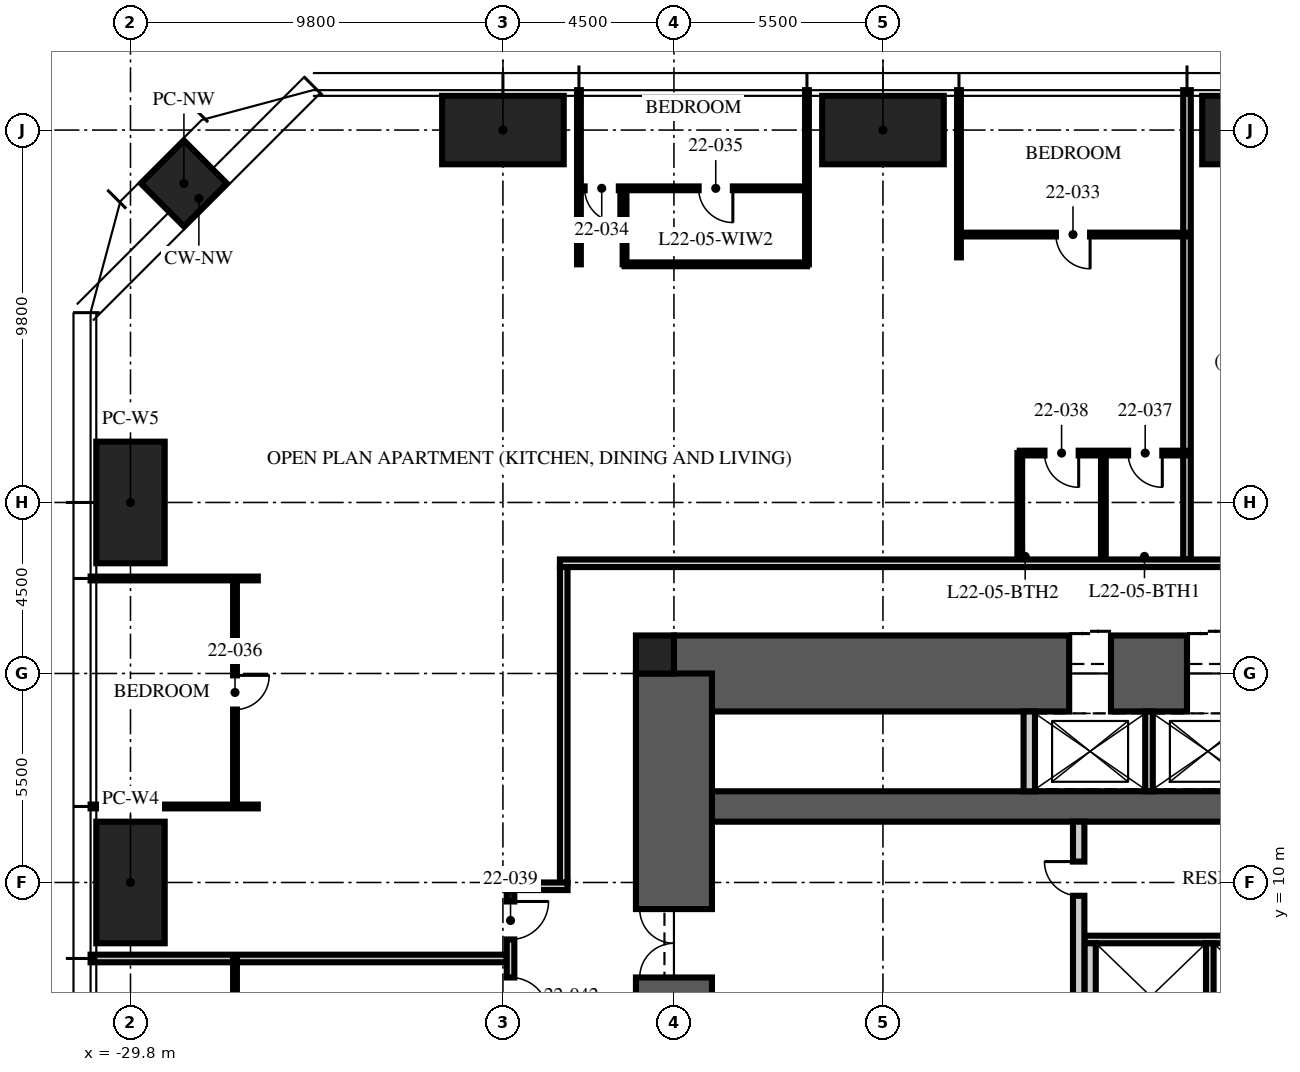
"""IFC4 building model, lengths in metres.
Left out: names, types, materials, properties, quantities, classifications, styles, units other than length and angle.
Written with IfcOpenShell. Run it as: python <this file> out.ifc"""

import sys

from ifc_helpers import new_model, si_unit, direction, frame, frame_2d, origin, origin_2d, place, context, subcontext, project, spatial, rectangle, hollow_rectangle, extrude, element, fill, save


model = new_model("IFC4")
c1 = context("Model", 3, precision=1e-05, world=origin(), true_north=direction((0.0, 1.0)))
c2 = subcontext(c1, "Body", "Model", "MODEL_VIEW")
j1 = project(units=[si_unit("LENGTHUNIT", "METRE"), si_unit("PLANEANGLEUNIT", "RADIAN")], contexts=[c1])
p1 = place(None, origin())
s1 = spatial("IfcSite", under=j1, at=p1, CompositionType="ELEMENT")
p2 = place(p1, origin())
s2 = spatial("IfcBuilding", under=s1, at=p2, CompositionType="ELEMENT")
p3 = place(p2, frame((0.0, 0.0, 88.5)))
s3 = spatial("IfcBuildingStorey", under=s2, at=p3, CompositionType="ELEMENT", Elevation=88.5)
p4 = place(p3, frame((-15.5, 15.5, -0.25), z_axis=(0.0, 0.0, 1.0), x_axis=(1.0, 0.0, 0.0)))
e1 = element("IfcWall", 1, at=p4, inside=s3, PredefinedType="SHEAR", context=c2, shape_type="SweptSolid", body=[
    extrude(rectangle(XDim=31.0, YDim=2.0, at=frame_2d((15.5, 0.0))), origin(), (0.0, 0.0, 1.0), 3.75),
])
p5 = place(p4, frame((10.4, 0.0, 0.25)))
e2 = element("IfcOpeningElement", 2, at=p5, cuts=e1, PredefinedType="OPENING", context=c2, shape_type="SweptSolid", body=[
    extrude(rectangle(XDim=1.1, YDim=2.1, at=frame_2d((0.55, 1.05))), frame((0.0, 1.01, 0.0), z_axis=(0.0, -1.0, 0.0), x_axis=(1.0, 0.0, 0.0)), (0.0, 0.0, 1.0), 2.02),
])
p6 = place(p4, frame((13.5, 0.0, 0.25)))
e3 = element("IfcOpeningElement", 3, at=p6, cuts=e1, PredefinedType="OPENING", context=c2, shape_type="SweptSolid", body=[
    extrude(rectangle(XDim=1.1, YDim=2.1, at=frame_2d((0.55, 1.05))), frame((0.0, 1.01, 0.0), z_axis=(0.0, -1.0, 0.0), x_axis=(1.0, 0.0, 0.0)), (0.0, 0.0, 1.0), 2.02),
])
p7 = place(p4, frame((16.6, 0.0, 0.25)))
e4 = element("IfcOpeningElement", 4, at=p7, cuts=e1, PredefinedType="OPENING", context=c2, shape_type="SweptSolid", body=[
    extrude(rectangle(XDim=1.1, YDim=2.1, at=frame_2d((0.55, 1.05))), frame((0.0, 1.01, 0.0), z_axis=(0.0, -1.0, 0.0), x_axis=(1.0, 0.0, 0.0)), (0.0, 0.0, 1.0), 2.02),
])
p8 = place(p3, frame((-15.5, 12.0, -0.25), z_axis=(0.0, 0.0, 1.0), x_axis=(1.0, 0.0, 0.0)))
e5 = element("IfcWall", 5, at=p8, inside=s3, PredefinedType="SHEAR", context=c2, shape_type="SweptSolid", body=[
    extrude(rectangle(XDim=31.0, YDim=0.8, at=frame_2d((15.5, 0.0))), origin(), (0.0, 0.0, 1.0), 3.75),
])
p9 = place(p3, frame((-15.5, -15.5, -0.25), z_axis=(0.0, 0.0, 1.0), x_axis=(0.0, 1.0, 0.0)))
e6 = element("IfcWall", 6, at=p9, inside=s3, PredefinedType="SHEAR", context=c2, shape_type="SweptSolid", body=[
    extrude(rectangle(XDim=31.0, YDim=2.0, at=frame_2d((15.5, 0.0))), origin(), (0.0, 0.0, 1.0), 3.75),
])
p10 = place(p9, frame((6.5, 0.0, 0.25)))
e7 = element("IfcOpeningElement", 7, at=p10, cuts=e6, PredefinedType="OPENING", context=c2, shape_type="SweptSolid", body=[
    extrude(rectangle(XDim=1.2, YDim=2.1, at=frame_2d((0.6, 1.05))), frame((0.0, 1.01, 0.0), z_axis=(0.0, -1.0, 0.0), x_axis=(1.0, 0.0, 0.0)), (0.0, 0.0, 1.0), 2.02),
])
p11 = place(p9, frame((23.0, 0.0, 0.25)))
e8 = element("IfcOpeningElement", 8, at=p11, cuts=e6, PredefinedType="OPENING", context=c2, shape_type="SweptSolid", body=[
    extrude(rectangle(XDim=1.8, YDim=2.1, at=frame_2d((0.9, 1.05))), frame((0.0, 1.01, 0.0), z_axis=(0.0, -1.0, 0.0), x_axis=(1.0, 0.0, 0.0)), (0.0, 0.0, 1.0), 2.02),
])
p12 = place(p3, frame((-16.0, 16.0, -0.25), z_axis=(0.0, 0.0, 1.0), x_axis=(1.0, 0.0, 0.0)))
e9 = element("IfcColumn", 9, at=p12, inside=s3, PredefinedType="COLUMN", context=c2, shape_type="SweptSolid", body=[
    extrude(rectangle(XDim=1.0, YDim=1.0, at=origin_2d()), origin(), (0.0, 0.0, 1.0), 3.75),
])
for number, where, z_axis, x_axis in (
    (10, (-20.0, 29.8, 0.0), (0.0, 0.0, 1.0), (1.0, 0.0, 0.0)),
    (11, (-10.0, 29.8, 0.0), (0.0, 0.0, 1.0), (1.0, 0.0, 0.0)),
    (12, (0.0, 29.8, 0.0), (0.0, 0.0, 1.0), (1.0, 0.0, 0.0)),
    (13, (-29.8, 10.0, 0.0), (0.0, 0.0, 1.0), (0.0, 1.0, 0.0)),
    (14, (-29.8, 20.0, 0.0), (0.0, 0.0, 1.0), (0.0, 1.0, 0.0)),
):
    element("IfcColumn", number, at=place(p3, frame(where, z_axis=z_axis, x_axis=x_axis)), inside=s3, PredefinedType="COLUMN", context=c2, shape_type="SweptSolid", body=[
        extrude(hollow_rectangle(XDim=3.2, YDim=1.8, WallThickness=0.2, at=origin_2d()), origin(), (0.0, 0.0, 1.0), 3.75),
    ])
p13 = place(p3, frame((-28.394, 28.394, 0.0), z_axis=(0.0, 0.0, 1.0), x_axis=(0.707106781187, 0.707106781187, 0.0)))
e15 = element("IfcColumn", 15, at=p13, inside=s3, PredefinedType="COLUMN", context=c2, shape_type="SweptSolid", body=[
    extrude(hollow_rectangle(XDim=1.6, YDim=1.6, WallThickness=0.1, at=origin_2d()), origin(), (0.0, 0.0, 1.0), 3.75),
])
p14 = place(p3, frame((-4.7, 8.5, 0.0), z_axis=(0.0, 0.0, 1.0), x_axis=(1.0, 0.0, 0.0)))
e16 = element("IfcWall", 16, at=p14, inside=s3, PredefinedType="PARTITIONING", context=c2, shape_type="SweptSolid", body=[
    extrude(rectangle(XDim=9.7, YDim=0.2, at=frame_2d((4.85, 0.0))), origin(), (0.0, 0.0, 1.0), 3.5),
])
p15 = place(p3, frame((-4.55, 5.6, 0.0), z_axis=(0.0, 0.0, 1.0), x_axis=(0.0, 1.0, 0.0)))
e17 = element("IfcWall", 17, at=p15, inside=s3, PredefinedType="PARTITIONING", context=c2, shape_type="SweptSolid", body=[
    extrude(rectangle(XDim=2.8, YDim=0.3, at=frame_2d((1.4, 0.0))), origin(), (0.0, 0.0, 1.0), 3.5),
])
p16 = place(p3, frame((-1.4, 5.6, 0.0), z_axis=(0.0, 0.0, 1.0), x_axis=(0.0, 1.0, 0.0)))
e18 = element("IfcWall", 18, at=p16, inside=s3, PredefinedType="PARTITIONING", context=c2, shape_type="SweptSolid", body=[
    extrude(rectangle(XDim=2.8, YDim=0.2, at=frame_2d((1.4, 0.0))), origin(), (0.0, 0.0, 1.0), 3.5),
])
p17 = place(p3, frame((-6.15, 12.4, 0.0), z_axis=(0.0, 0.0, 1.0), x_axis=(0.0, 1.0, 0.0)))
e19 = element("IfcWall", 19, at=p17, inside=s3, PredefinedType="PARTITIONING", context=c2, shape_type="SweptSolid", body=[
    extrude(rectangle(XDim=2.1, YDim=0.3, at=frame_2d((1.05, 0.0))), origin(), (0.0, 0.0, 1.0), 3.5),
])
p18 = place(p3, frame((-3.0, 12.4, 0.0), z_axis=(0.0, 0.0, 1.0), x_axis=(0.0, 1.0, 0.0)))
e20 = element("IfcWall", 20, at=p18, inside=s3, PredefinedType="PARTITIONING", context=c2, shape_type="SweptSolid", body=[
    extrude(rectangle(XDim=2.1, YDim=0.2, at=frame_2d((1.05, 0.0))), origin(), (0.0, 0.0, 1.0), 3.5),
])
p19 = place(p3, frame((-4.85, 5.3, 0.0), z_axis=(0.0, 0.0, 1.0), x_axis=(0.0, 1.0, 0.0)))
e21 = element("IfcWall", 21, at=p19, inside=s3, PredefinedType="PARTITIONING", context=c2, shape_type="SweptSolid", body=[
    extrude(rectangle(XDim=6.3, YDim=0.3, at=frame_2d((3.15, 0.0))), origin(), (0.0, 0.0, 1.0), 3.5),
])
p20 = place(p19, frame((4.35, 0.0, 0.0)))
e22 = element("IfcOpeningElement", 22, at=p20, cuts=e21, PredefinedType="OPENING", context=c2, shape_type="SweptSolid", body=[
    extrude(rectangle(XDim=0.9, YDim=2.1, at=frame_2d((0.45, 1.05))), frame((0.0, 0.16, 0.0), z_axis=(0.0, -1.0, 0.0), x_axis=(1.0, 0.0, 0.0)), (0.0, 0.0, 1.0), 0.32),
])
p21 = place(p3, frame((-2.0, 18.5, 0.0), z_axis=(0.0, 0.0, 1.0), x_axis=(0.0, 1.0, 0.0)))
e23 = element("IfcWall", 23, at=p21, inside=s3, PredefinedType="PARTITIONING", context=c2, shape_type="SweptSolid", body=[
    extrude(rectangle(XDim=12.35, YDim=0.2, at=frame_2d((6.175, 0.0))), origin(), (0.0, 0.0, 1.0), 2.71),
])
p22 = place(p3, frame((-8.0, 26.45, 0.0), z_axis=(0.0, 0.0, 1.0), x_axis=(0.0, 1.0, 0.0)))
e24 = element("IfcWall", 24, at=p22, inside=s3, PredefinedType="PARTITIONING", context=c2, shape_type="SweptSolid", body=[
    extrude(rectangle(XDim=4.4, YDim=0.1, at=frame_2d((2.2, 0.0))), origin(), (0.0, 0.0, 1.0), 2.71),
])
for number, where, z_axis, x_axis in (
    (25, (-12.0, 26.267, 0.0), (0.0, 0.0, 1.0), (0.0, 1.0, 0.0)),
    (26, (-18.0, 26.267, 0.0), (0.0, 0.0, 1.0), (0.0, 1.0, 0.0)),
):
    element("IfcWall", number, at=place(p3, frame(where, z_axis=z_axis, x_axis=x_axis)), inside=s3, PredefinedType="PARTITIONING", context=c2, shape_type="SweptSolid", body=[
        extrude(rectangle(XDim=4.583, YDim=0.1, at=frame_2d((2.292, 0.0))), origin(), (0.0, 0.0, 1.0), 2.71),
    ])
for number, where, z_axis, x_axis in (
    (27, (-26.45, 18.0, 0.0), (0.0, 0.0, 1.0), (-1.0, 0.0, 0.0)),
    (28, (-26.45, 12.0, 0.0), (0.0, 0.0, 1.0), (-1.0, 0.0, 0.0)),
):
    element("IfcWall", number, at=place(p3, frame(where, z_axis=z_axis, x_axis=x_axis)), inside=s3, PredefinedType="PARTITIONING", context=c2, shape_type="SweptSolid", body=[
        extrude(rectangle(XDim=4.4, YDim=0.1, at=frame_2d((2.2, 0.0))), origin(), (0.0, 0.0, 1.0), 2.71),
    ])
p23 = place(p3, frame((-19.9, 8.0, 0.0), z_axis=(0.0, 0.0, 1.0), x_axis=(-1.0, 0.0, 0.0)))
e29 = element("IfcWall", 29, at=p23, inside=s3, PredefinedType="PARTITIONING", context=c2, shape_type="SweptSolid", body=[
    extrude(rectangle(XDim=10.95, YDim=0.2, at=frame_2d((5.475, 0.0))), origin(), (0.0, 0.0, 1.0), 2.71),
])
p24 = place(p3, frame((-2.0, 27.05, 0.0), z_axis=(0.0, 0.0, 1.0), x_axis=(-1.0, 0.0, 0.0)))
e30 = element("IfcWall", 30, at=p24, inside=s3, PredefinedType="PARTITIONING", context=c2, shape_type="SweptSolid", body=[
    extrude(rectangle(XDim=6.0, YDim=0.1, at=frame_2d((3.0, 0.0))), origin(), (0.0, 0.0, 1.0), 2.61),
])
p25 = place(p24, frame((2.55, 0.0, 0.0)))
e31 = element("IfcOpeningElement", 31, at=p25, cuts=e30, PredefinedType="OPENING", context=c2, shape_type="SweptSolid", body=[
    extrude(rectangle(XDim=0.9, YDim=2.1, at=frame_2d((0.45, 1.05))), frame((0.0, 0.06, 0.0), z_axis=(0.0, -1.0, 0.0), x_axis=(1.0, 0.0, 0.0)), (0.0, 0.0, 1.0), 0.12),
])
p26 = place(p3, frame((-12.0, 28.267, 0.0), z_axis=(0.0, 0.0, 1.0), x_axis=(-1.0, 0.0, 0.0)))
e32 = element("IfcWall", 32, at=p26, inside=s3, PredefinedType="PARTITIONING", context=c2, shape_type="SweptSolid", body=[
    extrude(rectangle(XDim=6.0, YDim=0.1, at=frame_2d((3.0, 0.0))), origin(), (0.0, 0.0, 1.0), 2.61),
])
p27 = place(p26, frame((4.95, 0.0, 0.0)))
e33 = element("IfcOpeningElement", 33, at=p27, cuts=e32, PredefinedType="OPENING", context=c2, shape_type="SweptSolid", body=[
    extrude(rectangle(XDim=0.9, YDim=2.1, at=frame_2d((0.45, 1.05))), frame((0.0, 0.06, 0.0), z_axis=(0.0, -1.0, 0.0), x_axis=(1.0, 0.0, 0.0)), (0.0, 0.0, 1.0), 0.12),
])
p28 = place(p26, frame((1.95, 0.0, 0.0)))
e34 = element("IfcOpeningElement", 34, at=p28, cuts=e32, PredefinedType="OPENING", context=c2, shape_type="SweptSolid", body=[
    extrude(rectangle(XDim=0.9, YDim=2.1, at=frame_2d((0.45, 1.05))), frame((0.0, 0.06, 0.0), z_axis=(0.0, -1.0, 0.0), x_axis=(1.0, 0.0, 0.0)), (0.0, 0.0, 1.0), 0.12),
])
p29 = place(p3, frame((-16.8, 26.267, 0.0), z_axis=(0.0, 0.0, 1.0), x_axis=(0.0, 1.0, 0.0)))
e35 = element("IfcWall", 35, at=p29, inside=s3, PredefinedType="PARTITIONING", context=c2, shape_type="SweptSolid", body=[
    extrude(rectangle(XDim=2.0, YDim=0.1, at=frame_2d((1.0, 0.0))), origin(), (0.0, 0.0, 1.0), 3.5),
])
p30 = place(p3, frame((-12.0, 26.267, 0.0), z_axis=(0.0, 0.0, 1.0), x_axis=(-1.0, 0.0, 0.0)))
e36 = element("IfcWall", 36, at=p30, inside=s3, PredefinedType="PARTITIONING", context=c2, shape_type="SweptSolid", body=[
    extrude(rectangle(XDim=4.8, YDim=0.1, at=frame_2d((2.4, 0.0))), origin(), (0.0, 0.0, 1.0), 2.61),
])
p31 = place(p3, frame((-27.05, 18.0, 0.0), z_axis=(0.0, 0.0, 1.0), x_axis=(0.0, -1.0, 0.0)))
e37 = element("IfcWall", 37, at=p31, inside=s3, PredefinedType="PARTITIONING", context=c2, shape_type="SweptSolid", body=[
    extrude(rectangle(XDim=6.0, YDim=0.1, at=frame_2d((3.0, 0.0))), origin(), (0.0, 0.0, 1.0), 2.61),
])
p32 = place(p31, frame((2.55, 0.0, 0.0)))
e38 = element("IfcOpeningElement", 38, at=p32, cuts=e37, PredefinedType="OPENING", context=c2, shape_type="SweptSolid", body=[
    extrude(rectangle(XDim=0.9, YDim=2.1, at=frame_2d((0.45, 1.05))), frame((0.0, 0.06, 0.0), z_axis=(0.0, -1.0, 0.0), x_axis=(1.0, 0.0, 0.0)), (0.0, 0.0, 1.0), 0.12),
])
p33 = place(p3, frame((-2.0, 21.3, 0.0), z_axis=(0.0, 0.0, 1.0), x_axis=(-1.0, 0.0, 0.0)))
e39 = element("IfcWall", 39, at=p33, inside=s3, PredefinedType="PARTITIONING", context=c2, shape_type="SweptSolid", body=[
    extrude(rectangle(XDim=4.4, YDim=0.125, at=frame_2d((2.2, 0.0))), origin(), (0.0, 0.0, 1.0), 2.61),
])
p34 = place(p33, frame((0.65, 0.0, 0.0)))
e40 = element("IfcOpeningElement", 40, at=p34, cuts=e39, PredefinedType="OPENING", context=c2, shape_type="SweptSolid", body=[
    extrude(rectangle(XDim=0.9, YDim=2.1, at=frame_2d((0.45, 1.05))), frame((0.0, 0.073, 0.0), z_axis=(0.0, -1.0, 0.0), x_axis=(1.0, 0.0, 0.0)), (0.0, 0.0, 1.0), 0.145),
])
p35 = place(p33, frame((2.85, 0.0, 0.0)))
e41 = element("IfcOpeningElement", 41, at=p35, cuts=e39, PredefinedType="OPENING", context=c2, shape_type="SweptSolid", body=[
    extrude(rectangle(XDim=0.9, YDim=2.1, at=frame_2d((0.45, 1.05))), frame((0.0, 0.073, 0.0), z_axis=(0.0, -1.0, 0.0), x_axis=(1.0, 0.0, 0.0)), (0.0, 0.0, 1.0), 0.145),
])
for number, where, z_axis, x_axis in (
    (42, (-4.2, 18.5, 0.0), (0.0, 0.0, 1.0), (0.0, 1.0, 0.0)),
    (43, (-6.4, 18.5, 0.0), (0.0, 0.0, 1.0), (0.0, 1.0, 0.0)),
):
    element("IfcWall", number, at=place(p3, frame(where, z_axis=z_axis, x_axis=x_axis)), inside=s3, PredefinedType="PARTITIONING", context=c2, shape_type="SweptSolid", body=[
        extrude(rectangle(XDim=2.8, YDim=0.125, at=frame_2d((1.4, 0.0))), origin(), (0.0, 0.0, 1.0), 3.5),
    ])
p36 = place(p3, frame((-27.05, 8.0, 0.0), z_axis=(0.0, 0.0, 1.0), x_axis=(0.0, -1.0, 0.0)))
e44 = element("IfcWall", 44, at=p36, inside=s3, PredefinedType="PARTITIONING", context=c2, shape_type="SweptSolid", body=[
    extrude(rectangle(XDim=6.0, YDim=0.1, at=frame_2d((3.0, 0.0))), origin(), (0.0, 0.0, 1.0), 2.61),
])
p37 = place(p36, frame((2.55, 0.0, 0.0)))
e45 = element("IfcOpeningElement", 45, at=p37, cuts=e44, PredefinedType="OPENING", context=c2, shape_type="SweptSolid", body=[
    extrude(rectangle(XDim=0.9, YDim=2.1, at=frame_2d((0.45, 1.05))), frame((0.0, 0.06, 0.0), z_axis=(0.0, -1.0, 0.0), x_axis=(1.0, 0.0, 0.0)), (0.0, 0.0, 1.0), 0.12),
])
p38 = place(p3, frame((-18.5, 18.4, 0.0), z_axis=(0.0, 0.0, 1.0), x_axis=(1.0, 0.0, 0.0)))
e46 = element("IfcWall", 46, at=p38, inside=s3, PredefinedType="PARTITIONING", context=c2, shape_type="SweptSolid", body=[
    extrude(rectangle(XDim=24.5, YDim=0.2, at=frame_2d((12.25, 0.0))), origin(), (0.0, 0.0, 1.0), 2.3),
])
p39 = place(p3, frame((-18.4, 18.3, 0.0), z_axis=(0.0, 0.0, 1.0), x_axis=(0.0, -1.0, 0.0)))
e47 = element("IfcWall", 47, at=p39, inside=s3, PredefinedType="PARTITIONING", context=c2, shape_type="SweptSolid", body=[
    extrude(rectangle(XDim=8.3, YDim=0.2, at=frame_2d((4.15, 0.0))), origin(), (0.0, 0.0, 1.0), 2.3),
])
p40 = place(p3, frame((-18.3, 9.9, 0.0), z_axis=(0.0, 0.0, 1.0), x_axis=(-1.0, 0.0, 0.0)))
e48 = element("IfcWall", 48, at=p40, inside=s3, PredefinedType="PARTITIONING", context=c2, shape_type="SweptSolid", body=[
    extrude(rectangle(XDim=1.6, YDim=0.2, at=frame_2d((0.8, 0.0))), origin(), (0.0, 0.0, 1.0), 2.492),
])
p41 = place(p3, frame((-19.8, 9.8, 0.0), z_axis=(0.0, 0.0, 1.0), x_axis=(0.0, -1.0, 0.0)))
e49 = element("IfcWall", 49, at=p41, inside=s3, PredefinedType="PARTITIONING", context=c2, shape_type="SweptSolid", body=[
    extrude(rectangle(XDim=3.6, YDim=0.2, at=frame_2d((1.8, 0.0))), origin(), (0.0, 0.0, 1.0), 3.5),
])
p42 = place(p41, frame((0.3, 0.0, 0.0)))
e50 = element("IfcOpeningElement", 50, at=p42, cuts=e49, PredefinedType="OPENING", context=c2, shape_type="SweptSolid", body=[
    extrude(rectangle(XDim=1.0, YDim=2.2, at=frame_2d((0.5, 1.1))), frame((0.0, 0.11, 0.0), z_axis=(0.0, -1.0, 0.0), x_axis=(1.0, 0.0, 0.0)), (0.0, 0.0, 1.0), 0.22),
])
p43 = place(p41, frame((2.3, 0.0, 0.0)))
e51 = element("IfcOpeningElement", 51, at=p43, cuts=e49, PredefinedType="OPENING", context=c2, shape_type="SweptSolid", body=[
    extrude(rectangle(XDim=1.0, YDim=2.2, at=frame_2d((0.5, 1.1))), frame((0.0, 0.11, 0.0), z_axis=(0.0, -1.0, 0.0), x_axis=(1.0, 0.0, 0.0)), (0.0, 0.0, 1.0), 0.22),
])
p44 = place(p11, origin())
e52 = element("IfcDoor", 52, at=p44, inside=s3, OperationType="DOUBLE_DOOR_SINGLE_SWING", PredefinedType="DOOR", context=c2, shape_type="SweptSolid", body=[
    extrude(rectangle(XDim=1.8, YDim=2.1, at=frame_2d((0.9, 1.05))), frame((0.0, 0.025, 0.0), z_axis=(0.0, -1.0, 0.0), x_axis=(1.0, 0.0, 0.0)), (0.0, 0.0, 1.0), 0.05),
])
fill(e8, e52)
p45 = place(p5, origin())
e53 = element("IfcDoor", 53, at=p45, inside=s3, OperationType="DOUBLE_DOOR_SLIDING", PredefinedType="DOOR", context=c2, shape_type="SweptSolid", body=[
    extrude(rectangle(XDim=1.1, YDim=2.1, at=frame_2d((0.55, 1.05))), frame((0.0, 0.025, 0.0), z_axis=(0.0, -1.0, 0.0), x_axis=(1.0, 0.0, 0.0)), (0.0, 0.0, 1.0), 0.05),
])
fill(e2, e53)
p46 = place(p6, origin())
e54 = element("IfcDoor", 54, at=p46, inside=s3, OperationType="DOUBLE_DOOR_SLIDING", PredefinedType="DOOR", context=c2, shape_type="SweptSolid", body=[
    extrude(rectangle(XDim=1.1, YDim=2.1, at=frame_2d((0.55, 1.05))), frame((0.0, 0.025, 0.0), z_axis=(0.0, -1.0, 0.0), x_axis=(1.0, 0.0, 0.0)), (0.0, 0.0, 1.0), 0.05),
])
fill(e3, e54)
p47 = place(p20, origin())
e55 = element("IfcDoor", 55, at=p47, inside=s3, OperationType="SINGLE_SWING_RIGHT", PredefinedType="DOOR", context=c2, shape_type="SweptSolid", body=[
    extrude(rectangle(XDim=0.9, YDim=2.1, at=frame_2d((0.45, 1.05))), frame((0.0, 0.025, 0.0), z_axis=(0.0, -1.0, 0.0), x_axis=(1.0, 0.0, 0.0)), (0.0, 0.0, 1.0), 0.05),
])
fill(e22, e55)
p48 = place(p25, origin())
e56 = element("IfcDoor", 56, at=p48, inside=s3, OperationType="SINGLE_SWING_LEFT", PredefinedType="DOOR", context=c2, shape_type="SweptSolid", body=[
    extrude(rectangle(XDim=0.9, YDim=2.1, at=frame_2d((0.45, 1.05))), frame((0.0, 0.025, 0.0), z_axis=(0.0, -1.0, 0.0), x_axis=(1.0, 0.0, 0.0)), (0.0, 0.0, 1.0), 0.05),
])
fill(e31, e56)
p49 = place(p27, origin())
e57 = element("IfcDoor", 57, at=p49, inside=s3, OperationType="SINGLE_SWING_LEFT", PredefinedType="DOOR", context=c2, shape_type="SweptSolid", body=[
    extrude(rectangle(XDim=0.9, YDim=2.1, at=frame_2d((0.45, 1.05))), frame((0.0, 0.025, 0.0), z_axis=(0.0, -1.0, 0.0), x_axis=(1.0, 0.0, 0.0)), (0.0, 0.0, 1.0), 0.05),
])
fill(e33, e57)
p50 = place(p28, origin())
e58 = element("IfcDoor", 58, at=p50, inside=s3, OperationType="SINGLE_SWING_LEFT", PredefinedType="DOOR", context=c2, shape_type="SweptSolid", body=[
    extrude(rectangle(XDim=0.9, YDim=2.1, at=frame_2d((0.45, 1.05))), frame((0.0, 0.025, 0.0), z_axis=(0.0, -1.0, 0.0), x_axis=(1.0, 0.0, 0.0)), (0.0, 0.0, 1.0), 0.05),
])
fill(e34, e58)
p51 = place(p32, origin())
e59 = element("IfcDoor", 59, at=p51, inside=s3, OperationType="SINGLE_SWING_LEFT", PredefinedType="DOOR", context=c2, shape_type="SweptSolid", body=[
    extrude(rectangle(XDim=0.9, YDim=2.1, at=frame_2d((0.45, 1.05))), frame((0.0, 0.025, 0.0), z_axis=(0.0, -1.0, 0.0), x_axis=(1.0, 0.0, 0.0)), (0.0, 0.0, 1.0), 0.05),
])
fill(e38, e59)
p52 = place(p34, origin())
e60 = element("IfcDoor", 60, at=p52, inside=s3, OperationType="SINGLE_SWING_LEFT", PredefinedType="DOOR", context=c2, shape_type="SweptSolid", body=[
    extrude(rectangle(XDim=0.9, YDim=2.1, at=frame_2d((0.45, 1.05))), frame((0.0, 0.025, 0.0), z_axis=(0.0, -1.0, 0.0), x_axis=(1.0, 0.0, 0.0)), (0.0, 0.0, 1.0), 0.05),
])
fill(e40, e60)
p53 = place(p35, origin())
e61 = element("IfcDoor", 61, at=p53, inside=s3, OperationType="SINGLE_SWING_LEFT", PredefinedType="DOOR", context=c2, shape_type="SweptSolid", body=[
    extrude(rectangle(XDim=0.9, YDim=2.1, at=frame_2d((0.45, 1.05))), frame((0.0, 0.025, 0.0), z_axis=(0.0, -1.0, 0.0), x_axis=(1.0, 0.0, 0.0)), (0.0, 0.0, 1.0), 0.05),
])
fill(e41, e61)
p54 = place(p42, origin())
e62 = element("IfcDoor", 62, at=p54, inside=s3, OperationType="SINGLE_SWING_LEFT", PredefinedType="DOOR", context=c2, shape_type="SweptSolid", body=[
    extrude(rectangle(XDim=1.0, YDim=2.2, at=frame_2d((0.5, 1.1))), frame((0.0, 0.025, 0.0), z_axis=(0.0, -1.0, 0.0), x_axis=(1.0, 0.0, 0.0)), (0.0, 0.0, 1.0), 0.05),
])
fill(e50, e62)
p55 = place(p43, origin())
e63 = element("IfcDoor", 63, at=p55, inside=s3, OperationType="SINGLE_SWING_RIGHT", PredefinedType="DOOR", context=c2, shape_type="SweptSolid", body=[
    extrude(rectangle(XDim=1.0, YDim=2.2, at=frame_2d((0.5, 1.1))), frame((0.0, 0.025, 0.0), z_axis=(0.0, -1.0, 0.0), x_axis=(1.0, 0.0, 0.0)), (0.0, 0.0, 1.0), 0.05),
])
fill(e51, e63)
save(model, sys.argv[1])
